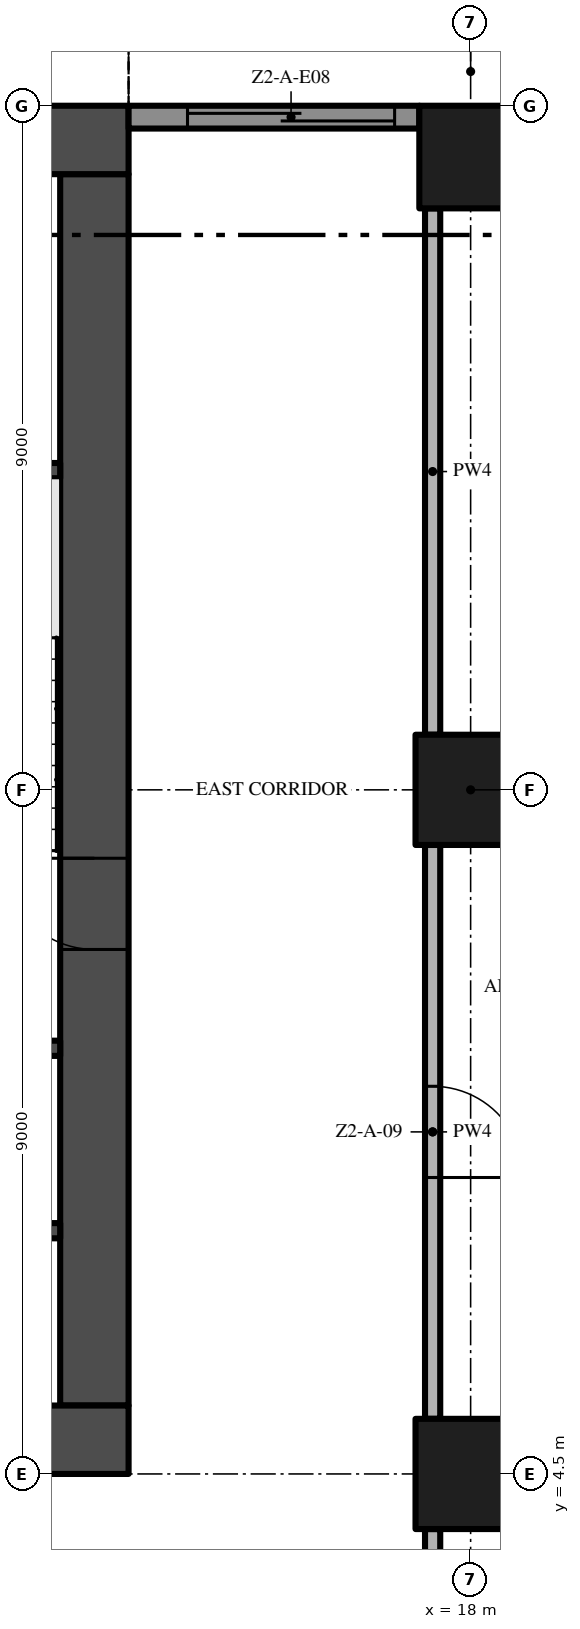
"""IFC4 building model, lengths in metres.
Left out: names, types, materials, properties, quantities, classifications, styles, units other than length and angle.
Written with IfcOpenShell. Run it as: python <this file> out.ifc"""

import sys

from ifc_helpers import new_model, si_unit, direction, frame, frame_2d, origin, origin_2d, place, context, subcontext, project, spatial, rectangle, extrude, element, fill, save


model = new_model("IFC4")
c1 = context("Model", 3, precision=1e-05, world=origin(), true_north=direction((0.0, 1.0)))
c2 = subcontext(c1, "Body", "Model", "MODEL_VIEW")
j1 = project(units=[si_unit("LENGTHUNIT", "METRE"), si_unit("PLANEANGLEUNIT", "RADIAN")], contexts=[c1])
p1 = place(None, origin())
s1 = spatial("IfcSite", under=j1, at=p1, CompositionType="ELEMENT")
p2 = place(p1, origin())
s2 = spatial("IfcBuilding", under=s1, at=p2, CompositionType="ELEMENT")
p3 = place(p2, frame((0.0, 0.0, 73.2)))
s3 = spatial("IfcBuildingStorey", under=s2, at=p3, CompositionType="ELEMENT", Elevation=73.2)
p4 = place(p3, frame((-13.5, 4.95, -0.3), z_axis=(0.0, 0.0, 1.0), x_axis=(1.0, 0.0, 0.0)))
e1 = element("IfcWall", 1, at=p4, inside=s3, PredefinedType="SHEAR", context=c2, shape_type="SweptSolid", body=[
    extrude(rectangle(XDim=27.0, YDim=0.9, at=frame_2d((13.5, 0.0))), origin(), (0.0, 0.0, 1.0), 3.8),
])
p5 = place(p4, frame((12.0, 0.0, 0.3)))
e2 = element("IfcOpeningElement", 2, at=p5, cuts=e1, PredefinedType="OPENING", context=c2, shape_type="SweptSolid", body=[
    extrude(rectangle(XDim=3.0, YDim=2.4, at=frame_2d((1.5, 1.2))), frame((0.0, 0.46, 0.0), z_axis=(0.0, -1.0, 0.0), x_axis=(1.0, 0.0, 0.0)), (0.0, 0.0, 1.0), 0.92),
])
p6 = place(p4, frame((4.9, 0.0, 0.3)))
e3 = element("IfcOpeningElement", 3, at=p6, cuts=e1, PredefinedType="OPENING", context=c2, shape_type="SweptSolid", body=[
    extrude(rectangle(XDim=1.2, YDim=2.2, at=frame_2d((0.6, 1.1))), frame((0.0, 0.46, 0.0), z_axis=(0.0, -1.0, 0.0), x_axis=(1.0, 0.0, 0.0)), (0.0, 0.0, 1.0), 0.92),
])
p7 = place(p4, frame((20.75, 0.0, 0.3)))
e4 = element("IfcOpeningElement", 4, at=p7, cuts=e1, PredefinedType="OPENING", context=c2, shape_type="SweptSolid", body=[
    extrude(rectangle(XDim=1.5, YDim=2.2, at=frame_2d((0.75, 1.1))), frame((0.0, 0.46, 0.0), z_axis=(0.0, -1.0, 0.0), x_axis=(1.0, 0.0, 0.0)), (0.0, 0.0, 1.0), 0.92),
])
p8 = place(p4, frame((17.4, 0.0, 0.3)))
e5 = element("IfcOpeningElement", 5, at=p8, cuts=e1, PredefinedType="OPENING", context=c2, shape_type="SweptSolid", body=[
    extrude(rectangle(XDim=1.2, YDim=2.2, at=frame_2d((0.6, 1.1))), frame((0.0, 0.46, 0.0), z_axis=(0.0, -1.0, 0.0), x_axis=(1.0, 0.0, 0.0)), (0.0, 0.0, 1.0), 0.92),
])
p9 = place(p3, frame((13.05, 5.4, -0.3), z_axis=(0.0, 0.0, 1.0), x_axis=(0.0, 1.0, 0.0)))
e6 = element("IfcWall", 6, at=p9, inside=s3, PredefinedType="SHEAR", context=c2, shape_type="SweptSolid", body=[
    extrude(rectangle(XDim=16.2, YDim=0.9, at=frame_2d((8.1, 0.0))), origin(), (0.0, 0.0, 1.0), 3.8),
])
p10 = place(p9, frame((6.0, 0.0, 0.3)))
e7 = element("IfcOpeningElement", 7, at=p10, cuts=e6, PredefinedType="OPENING", context=c2, shape_type="SweptSolid", body=[
    extrude(rectangle(XDim=1.2, YDim=2.2, at=frame_2d((0.6, 1.1))), frame((0.0, 0.46, 0.0), z_axis=(0.0, -1.0, 0.0), x_axis=(1.0, 0.0, 0.0)), (0.0, 0.0, 1.0), 0.92),
])
p11 = place(p3, frame((13.5, 22.05, -0.3), z_axis=(0.0, 0.0, 1.0), x_axis=(-1.0, 0.0, 0.0)))
e8 = element("IfcWall", 8, at=p11, inside=s3, PredefinedType="SHEAR", context=c2, shape_type="SweptSolid", body=[
    extrude(rectangle(XDim=27.0, YDim=0.9, at=frame_2d((13.5, 0.0))), origin(), (0.0, 0.0, 1.0), 3.8),
])
p12 = place(p3, frame((18.0, 13.5, 0.0), z_axis=(0.0, 0.0, 1.0), x_axis=(1.0, 0.0, 0.0)))
e9 = element("IfcColumn", 9, at=p12, inside=s3, PredefinedType="COLUMN", context=c2, shape_type="SweptSolid", body=[
    extrude(rectangle(XDim=1.45, YDim=1.45, at=origin_2d()), origin(), (0.0, 0.0, 1.0), 3.5),
])
p13 = place(p3, frame((18.0, 21.825, 0.0), z_axis=(0.0, 0.0, 1.0), x_axis=(1.0, 0.0, 0.0)))
e10 = element("IfcColumn", 10, at=p13, inside=s3, PredefinedType="COLUMN", context=c2, shape_type="SweptSolid", body=[
    extrude(rectangle(XDim=1.35, YDim=1.35, at=origin_2d()), origin(), (0.0, 0.0, 1.0), 3.5),
])
p14 = place(p3, frame((18.0, 4.5, 0.0), z_axis=(0.0, 0.0, 1.0), x_axis=(1.0, 0.0, 0.0)))
e11 = element("IfcColumn", 11, at=p14, inside=s3, PredefinedType="COLUMN", context=c2, shape_type="SweptSolid", body=[
    extrude(rectangle(XDim=1.45, YDim=1.45, at=origin_2d()), origin(), (0.0, 0.0, 1.0), 3.5),
])
p15 = place(p3, frame((13.5, 22.35, 0.0), z_axis=(0.0, 0.0, 1.0), x_axis=(1.0, 0.0, 0.0)))
e12 = element("IfcWall", 12, at=p15, inside=s3, PredefinedType="SOLIDWALL", context=c2, shape_type="SweptSolid", body=[
    extrude(rectangle(XDim=3.825, YDim=0.3, at=frame_2d((1.913, 0.0))), origin(), (0.0, 0.0, 1.0), 3.5),
])
p16 = place(p15, frame((0.775, 0.0, 0.0)))
e13 = element("IfcOpeningElement", 13, at=p16, cuts=e12, PredefinedType="OPENING", context=c2, shape_type="SweptSolid", body=[
    extrude(rectangle(XDim=2.725, YDim=2.4, at=frame_2d((1.363, 1.2))), frame((0.0, 0.16, 0.0), z_axis=(0.0, -1.0, 0.0), x_axis=(1.0, 0.0, 0.0)), (0.0, 0.0, 1.0), 0.32),
])
for number, where, z_axis, x_axis in (
    (14, (9.65, 7.7, 0.0), (0.0, 0.0, 1.0), (1.0, 0.0, 0.0)),
    (15, (9.65, 10.1, 0.0), (0.0, 0.0, 1.0), (1.0, 0.0, 0.0)),
    (16, (9.65, 17.7, 0.0), (0.0, 0.0, 1.0), (1.0, 0.0, 0.0)),
):
    element("IfcWall", number, at=place(p3, frame(where, z_axis=z_axis, x_axis=x_axis)), inside=s3, PredefinedType="SHEAR", context=c2, shape_type="SweptSolid", body=[
        extrude(rectangle(XDim=2.95, YDim=0.2, at=frame_2d((1.475, 0.0))), origin(), (0.0, 0.0, 1.0), 3.5),
    ])
p17 = place(p3, frame((17.5, -0.2, 0.0), z_axis=(0.0, 0.0, 1.0), x_axis=(0.0, 1.0, 0.0)))
e17 = element("IfcWall", 17, at=p17, inside=s3, PredefinedType="PARTITIONING", context=c2, shape_type="SweptSolid", body=[
    extrude(rectangle(XDim=3.975, YDim=0.2, at=frame_2d((1.988, 0.0))), origin(), (0.0, 0.0, 1.0), 3.5),
])
p18 = place(p3, frame((17.5, 12.775, 0.0), z_axis=(0.0, 0.0, 1.0), x_axis=(0.0, -1.0, 0.0)))
e18 = element("IfcWall", 18, at=p18, inside=s3, PredefinedType="PARTITIONING", context=c2, shape_type="SweptSolid", body=[
    extrude(rectangle(XDim=7.55, YDim=0.2, at=frame_2d((3.775, 0.0))), origin(), (0.0, 0.0, 1.0), 3.5),
])
p19 = place(p18, frame((3.175, 0.0, 0.0)))
e19 = element("IfcOpeningElement", 19, at=p19, cuts=e18, PredefinedType="OPENING", context=c2, shape_type="SweptSolid", body=[
    extrude(rectangle(XDim=1.2, YDim=2.4, at=frame_2d((0.6, 1.2))), frame((0.0, 0.11, 0.0), z_axis=(0.0, -1.0, 0.0), x_axis=(1.0, 0.0, 0.0)), (0.0, 0.0, 1.0), 0.22),
])
p20 = place(p3, frame((17.5, 14.225, 0.0), z_axis=(0.0, 0.0, 1.0), x_axis=(0.0, 1.0, 0.0)))
e20 = element("IfcWall", 20, at=p20, inside=s3, PredefinedType="PARTITIONING", context=c2, shape_type="SweptSolid", body=[
    extrude(rectangle(XDim=6.925, YDim=0.2, at=frame_2d((3.462, 0.0))), origin(), (0.0, 0.0, 1.0), 3.5),
])
p21 = place(p16, origin())
e21 = element("IfcDoor", 21, at=p21, inside=s3, OperationType="SINGLE_SWING_LEFT", PredefinedType="DOOR", context=c2, shape_type="SweptSolid", body=[
    extrude(rectangle(XDim=2.725, YDim=2.4, at=frame_2d((1.363, 1.2))), frame((0.0, 0.025, 0.0), z_axis=(0.0, -1.0, 0.0), x_axis=(1.0, 0.0, 0.0)), (0.0, 0.0, 1.0), 0.05),
])
fill(e13, e21)
p22 = place(p10, frame((1.2, 0.0, 0.0), z_axis=(0.0, 0.0, 1.0), x_axis=(-1.0, 0.0, 0.0)))
e22 = element("IfcDoor", 22, at=p22, inside=s3, OperationType="SINGLE_SWING_LEFT", PredefinedType="DOOR", context=c2, shape_type="SweptSolid", body=[
    extrude(rectangle(XDim=1.2, YDim=2.2, at=frame_2d((0.6, 1.1))), frame((0.0, 0.025, 0.0), z_axis=(0.0, -1.0, 0.0), x_axis=(1.0, 0.0, 0.0)), (0.0, 0.0, 1.0), 0.05),
])
fill(e7, e22)
p23 = place(p19, origin())
e23 = element("IfcDoor", 23, at=p23, inside=s3, OperationType="SINGLE_SWING_RIGHT", PredefinedType="DOOR", context=c2, shape_type="SweptSolid", body=[
    extrude(rectangle(XDim=1.2, YDim=2.4, at=frame_2d((0.6, 1.2))), frame((0.0, 0.025, 0.0), z_axis=(0.0, -1.0, 0.0), x_axis=(1.0, 0.0, 0.0)), (0.0, 0.0, 1.0), 0.05),
])
fill(e19, e23)
save(model, sys.argv[1])
